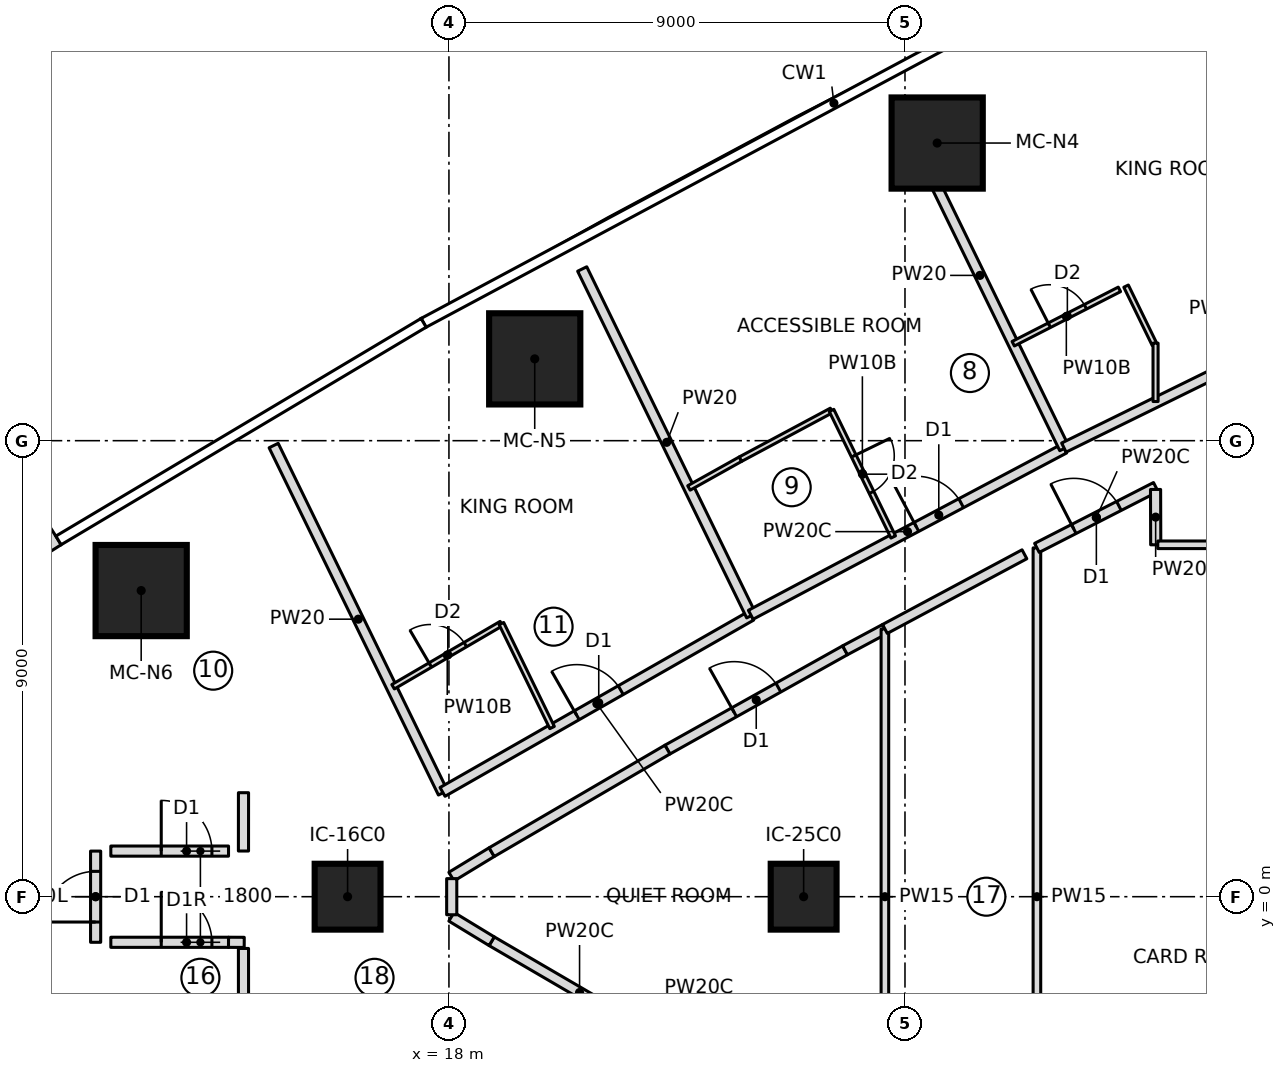
"""IFC4 building model, lengths in metres.
Left out: names, types, materials, properties, quantities, classifications, styles, units other than length and angle.
Written with IfcOpenShell. Run it as: python <this file> out.ifc"""

import sys

from ifc_helpers import new_model, si_unit, direction, frame, frame_2d, origin, origin_2d, place, context, subcontext, project, spatial, polyline, rectangle, outline, extrude, element, fill, save


model = new_model("IFC4")
c1 = context("Model", 3, precision=1e-05, world=origin(), true_north=direction((0.0, 1.0)))
c2 = subcontext(c1, "Body", "Model", "MODEL_VIEW")
j1 = project(units=[si_unit("LENGTHUNIT", "METRE"), si_unit("PLANEANGLEUNIT", "RADIAN")], contexts=[c1])
p1 = place(None, origin())
s1 = spatial("IfcSite", under=j1, at=p1, CompositionType="ELEMENT")
p2 = place(p1, origin())
s2 = spatial("IfcBuilding", under=s1, at=p2, CompositionType="ELEMENT")
p3 = place(p2, frame((0.0, 0.0, 71.55)))
s3 = spatial("IfcBuildingStorey", under=s2, at=p3, CompositionType="ELEMENT", Elevation=71.55)
for number, where, z_axis, x_axis in (
    (1, (27.635, 14.874, 0.0), (0.0, 0.0, 1.0), (1.0, 0.0, 0.0)),
    (2, (19.693, 10.615, 0.0), (0.0, 0.0, 1.0), (1.0, 0.0, 0.0)),
    (3, (11.927, 6.042, 0.0), (0.0, 0.0, 1.0), (1.0, 0.0, 0.0)),
):
    element("IfcColumn", number, at=place(p3, frame(where, z_axis=z_axis, x_axis=x_axis)), inside=s3, PredefinedType="COLUMN", context=c2, shape_type="SweptSolid", body=[
        extrude(rectangle(XDim=1.8, YDim=1.8, at=origin_2d()), origin(), (0.0, 0.0, 1.0), 3.55),
    ])
for number, where, z_axis, x_axis in (
    (4, (16.0, 0.0, 0.0), (0.0, 0.0, 1.0), (1.0, 0.0, 0.0)),
    (5, (25.0, 0.0, 0.0), (0.0, 0.0, 1.0), (1.0, 0.0, 0.0)),
):
    element("IfcColumn", number, at=place(p3, frame(where, z_axis=z_axis, x_axis=x_axis)), inside=s3, PredefinedType="COLUMN", context=c2, shape_type="SweptSolid", body=[
        extrude(rectangle(XDim=1.3, YDim=1.3, at=origin_2d()), origin(), (0.0, 0.0, 1.0), 3.55),
    ])
p4 = place(p3, frame((10.242, 7.116, 0.0), z_axis=(0.0, 0.0, 1.0), x_axis=(-0.844551578623, -0.535474211372, 0.0)))
e6 = element("IfcWall", 6, at=p4, inside=s3, PredefinedType="NOTDEFINED", context=c2, shape_type="SweptSolid", body=[
    extrude(outline(polyline([(0.0, -0.2), (4.23, -0.2), (4.162, 0.2), (0.0, 0.2), (0.0, -0.2)])), origin(), (0.0, 0.0, 1.0), 3.25),
])
p5 = place(p4, frame((0.998, 0.0, 0.6)))
e7 = element("IfcOpeningElement", 7, at=p5, cuts=e6, PredefinedType="OPENING", context=c2, shape_type="SweptSolid", body=[
    extrude(outline(polyline([(0.0, 1.35), (0.084, 1.771), (0.322, 2.128), (0.679, 2.366), (1.1, 2.45), (1.521, 2.366), (1.878, 2.128), (2.116, 1.771), (2.2, 1.35), (2.2, 1.1), (2.116, 0.679), (1.878, 0.322), (1.521, 0.084), (1.1, 0.0), (0.679, 0.084), (0.322, 0.322), (0.084, 0.679), (0.0, 1.1), (0.0, 1.35)])), frame((0.0, 0.21, 0.0), z_axis=(0.0, -1.0, 0.0), x_axis=(1.0, 0.0, 0.0)), (0.0, 0.0, 1.0), 0.42),
])
p6 = place(p3, frame((11.027, -0.9, 0.0), z_axis=(0.0, 0.0, 1.0), x_axis=(0.0, 1.0, 0.0)))
e8 = element("IfcWall", 8, at=p6, inside=s3, PredefinedType="PARTITIONING", context=c2, shape_type="SweptSolid", body=[
    extrude(rectangle(XDim=1.8, YDim=0.2, at=frame_2d((0.9, 0.0))), origin(), (0.0, 0.0, 1.0), 3.15),
])
p7 = place(p6, frame((0.4, 0.0, 0.0)))
e9 = element("IfcOpeningElement", 9, at=p7, cuts=e8, PredefinedType="OPENING", context=c2, shape_type="SweptSolid", body=[
    extrude(rectangle(XDim=1.0, YDim=2.1, at=frame_2d((0.5, 1.05))), frame((0.0, 0.11, 0.0), z_axis=(0.0, -1.0, 0.0), x_axis=(1.0, 0.0, 0.0)), (0.0, 0.0, 1.0), 0.22),
])
p8 = place(p3, frame((17.882, 2.05, 0.0), z_axis=(0.0, 0.0, 1.0), x_axis=(-0.438213564788, 0.898870887078, 0.0)))
e10 = element("IfcWall", 10, at=p8, inside=s3, PredefinedType="PARTITIONING", context=c2, shape_type="SweptSolid", body=[
    extrude(rectangle(XDim=7.625, YDim=0.2, at=frame_2d((3.813, 0.0))), origin(), (0.0, 0.0, 1.0), 3.15),
])
p9 = place(p3, frame((17.874, 2.068, 0.0), z_axis=(0.0, 0.0, 1.0), x_axis=(0.868427275315, 0.495816566373, 0.0)))
e11 = element("IfcWall", 11, at=p9, inside=s3, PredefinedType="PARTITIONING", context=c2, shape_type="SweptSolid", body=[
    extrude(rectangle(XDim=7.015, YDim=0.2, at=frame_2d((3.507, 0.0))), origin(), (0.0, 0.0, 1.0), 3.15),
])
p10 = place(p9, frame((3.05, 0.0, 0.0)))
e12 = element("IfcOpeningElement", 12, at=p10, cuts=e11, PredefinedType="OPENING", context=c2, shape_type="SweptSolid", body=[
    extrude(rectangle(XDim=1.0, YDim=2.1, at=frame_2d((0.5, 1.05))), frame((0.0, 0.11, 0.0), z_axis=(0.0, -1.0, 0.0), x_axis=(1.0, 0.0, 0.0)), (0.0, 0.0, 1.0), 0.22),
])
p11 = place(p3, frame((16.898, 4.144, 0.0), z_axis=(0.0, 0.0, 1.0), x_axis=(0.863707305865, 0.503993739837, 0.0)))
e13 = element("IfcWall", 13, at=p11, inside=s3, PredefinedType="PARTITIONING", context=c2, shape_type="SweptSolid", body=[
    extrude(rectangle(XDim=2.474, YDim=0.1, at=frame_2d((1.237, 0.0))), origin(), (0.0, 0.0, 1.0), 3.15),
])
p12 = place(p11, frame((0.85, 0.0, 0.0)))
e14 = element("IfcOpeningElement", 14, at=p12, cuts=e13, PredefinedType="OPENING", context=c2, shape_type="SweptSolid", body=[
    extrude(rectangle(XDim=0.8, YDim=2.1, at=frame_2d((0.4, 1.05))), frame((0.0, 0.06, 0.0), z_axis=(0.0, -1.0, 0.0), x_axis=(1.0, 0.0, 0.0)), (0.0, 0.0, 1.0), 0.12),
])
p13 = place(p3, frame((19.035, 5.39, 0.0), z_axis=(0.0, 0.0, 1.0), x_axis=(0.438122322582, -0.898915363344, 0.0)))
e15 = element("IfcWall", 15, at=p13, inside=s3, PredefinedType="PARTITIONING", context=c2, shape_type="SweptSolid", body=[
    extrude(rectangle(XDim=2.283, YDim=0.1, at=frame_2d((1.142, 0.0))), origin(), (0.0, 0.0, 1.0), 3.15),
])
p14 = place(p3, frame((23.965, 5.546, 0.0), z_axis=(0.0, 0.0, 1.0), x_axis=(-0.438184754816, 0.898884931816, 0.0)))
e16 = element("IfcWall", 16, at=p14, inside=s3, PredefinedType="PARTITIONING", context=c2, shape_type="SweptSolid", body=[
    extrude(rectangle(XDim=7.612, YDim=0.2, at=frame_2d((3.806, 0.0))), origin(), (0.0, 0.0, 1.0), 3.15),
])
p15 = place(p3, frame((23.957, 5.564, 0.0), z_axis=(0.0, 0.0, 1.0), x_axis=(0.883455325405, 0.468515408513, 0.0)))
e17 = element("IfcWall", 17, at=p15, inside=s3, PredefinedType="PARTITIONING", context=c2, shape_type="SweptSolid", body=[
    extrude(rectangle(XDim=7.004, YDim=0.2, at=frame_2d((3.502, 0.0))), origin(), (0.0, 0.0, 1.0), 3.15),
])
p16 = place(p15, frame((3.7, 0.0, 0.0)))
e18 = element("IfcOpeningElement", 18, at=p16, cuts=e17, PredefinedType="OPENING", context=c2, shape_type="SweptSolid", body=[
    extrude(rectangle(XDim=1.0, YDim=2.1, at=frame_2d((0.5, 1.05))), frame((0.0, 0.11, 0.0), z_axis=(0.0, -1.0, 0.0), x_axis=(1.0, 0.0, 0.0)), (0.0, 0.0, 1.0), 0.22),
])
p17 = place(p3, frame((22.737, 8.067, 0.0), z_axis=(0.0, 0.0, 1.0), x_axis=(0.872799020153, 0.488079778745, 0.0)))
e19 = element("IfcWall", 19, at=p17, inside=s3, PredefinedType="PARTITIONING", context=c2, shape_type="SweptSolid", body=[
    extrude(rectangle(XDim=1.165, YDim=0.1, at=frame_2d((0.582, 0.0))), origin(), (0.0, 0.0, 1.0), 3.15),
])
p18 = place(p3, frame((23.753, 8.635, 0.0), z_axis=(0.0, 0.0, 1.0), x_axis=(0.881675736231, 0.471855800156, 0.0)))
e20 = element("IfcWall", 20, at=p18, inside=s3, PredefinedType="PARTITIONING", context=c2, shape_type="SweptSolid", body=[
    extrude(rectangle(XDim=2.039, YDim=0.1, at=frame_2d((1.019, 0.0))), origin(), (0.0, 0.0, 1.0), 3.15),
])
p19 = place(p3, frame((25.55, 9.597, 0.0), z_axis=(0.0, 0.0, 1.0), x_axis=(0.43822975423, -0.898862994292, 0.0)))
e21 = element("IfcWall", 21, at=p19, inside=s3, PredefinedType="PARTITIONING", context=c2, shape_type="SweptSolid", body=[
    extrude(rectangle(XDim=2.779, YDim=0.1, at=frame_2d((1.389, 0.0))), origin(), (0.0, 0.0, 1.0), 3.15),
])
p20 = place(p19, frame((1.0, 0.0, 0.0)))
e22 = element("IfcOpeningElement", 22, at=p20, cuts=e21, PredefinedType="OPENING", context=c2, shape_type="SweptSolid", body=[
    extrude(rectangle(XDim=0.8, YDim=2.1, at=frame_2d((0.4, 1.05))), frame((0.0, 0.06, 0.0), z_axis=(0.0, -1.0, 0.0), x_axis=(1.0, 0.0, 0.0)), (0.0, 0.0, 1.0), 0.12),
])
p21 = place(p3, frame((30.144, 8.846, 0.0), z_axis=(0.0, 0.0, 1.0), x_axis=(-0.438185054829, 0.898884785567, 0.0)))
e23 = element("IfcWall", 23, at=p21, inside=s3, PredefinedType="PARTITIONING", context=c2, shape_type="SweptSolid", body=[
    extrude(rectangle(XDim=7.601, YDim=0.2, at=frame_2d((3.801, 0.0))), origin(), (0.0, 0.0, 1.0), 3.15),
])
p22 = place(p3, frame((30.135, 8.864, 0.0), z_axis=(0.0, 0.0, 1.0), x_axis=(0.897599118183, 0.44081268475, 0.0)))
e24 = element("IfcWall", 24, at=p22, inside=s3, PredefinedType="PARTITIONING", context=c2, shape_type="SweptSolid", body=[
    extrude(rectangle(XDim=7.0, YDim=0.2, at=frame_2d((3.5, 0.0))), origin(), (0.0, 0.0, 1.0), 3.15),
])
p23 = place(p22, frame((4.25, 0.0, 0.0)))
e25 = element("IfcOpeningElement", 25, at=p23, cuts=e24, PredefinedType="OPENING", context=c2, shape_type="SweptSolid", body=[
    extrude(rectangle(XDim=1.0, YDim=2.1, at=frame_2d((0.5, 1.05))), frame((0.0, 0.11, 0.0), z_axis=(0.0, -1.0, 0.0), x_axis=(1.0, 0.0, 0.0)), (0.0, 0.0, 1.0), 0.22),
])
p24 = place(p3, frame((29.136, 10.914, 0.0), z_axis=(0.0, 0.0, 1.0), x_axis=(0.890219804082, 0.45553122881, 0.0)))
e26 = element("IfcWall", 26, at=p24, inside=s3, PredefinedType="PARTITIONING", context=c2, shape_type="SweptSolid", body=[
    extrude(rectangle(XDim=2.354, YDim=0.1, at=frame_2d((1.177, 0.0))), origin(), (0.0, 0.0, 1.0), 3.15),
])
p25 = place(p24, frame((0.8, 0.0, 0.0)))
e27 = element("IfcOpeningElement", 27, at=p25, cuts=e26, PredefinedType="OPENING", context=c2, shape_type="SweptSolid", body=[
    extrude(rectangle(XDim=0.8, YDim=2.1, at=frame_2d((0.4, 1.05))), frame((0.0, 0.06, 0.0), z_axis=(0.0, -1.0, 0.0), x_axis=(1.0, 0.0, 0.0)), (0.0, 0.0, 1.0), 0.12),
])
p26 = place(p3, frame((31.363, 12.05, 0.0), z_axis=(0.0, 0.0, 1.0), x_axis=(0.438356099343, -0.898801385273, 0.0)))
e28 = element("IfcWall", 28, at=p26, inside=s3, PredefinedType="PARTITIONING", context=c2, shape_type="SweptSolid", body=[
    extrude(rectangle(XDim=1.282, YDim=0.1, at=frame_2d((0.641, 0.0))), origin(), (0.0, 0.0, 1.0), 3.15),
])
p27 = place(p3, frame((22.312, 2.903, 0.0), z_axis=(0.0, 0.0, 1.0), x_axis=(0.872800289292, 0.488077509225, 0.0)))
e29 = element("IfcWall", 29, at=p27, inside=s3, PredefinedType="PARTITIONING", context=c2, shape_type="SweptSolid", body=[
    extrude(rectangle(XDim=4.016, YDim=0.2, at=frame_2d((2.008, 0.0))), origin(), (0.0, 0.0, 1.0), 3.15),
])
p28 = place(p27, frame((1.508, 0.0, 0.0)))
e30 = element("IfcOpeningElement", 30, at=p28, cuts=e29, PredefinedType="OPENING", context=c2, shape_type="SweptSolid", body=[
    extrude(rectangle(XDim=1.0, YDim=2.1, at=frame_2d((0.5, 1.05))), frame((0.0, 0.11, 0.0), z_axis=(0.0, -1.0, 0.0), x_axis=(1.0, 0.0, 0.0)), (0.0, 0.0, 1.0), 0.22),
])
p29 = place(p3, frame((22.312, -2.903, 0.0), z_axis=(0.0, 0.0, 1.0), x_axis=(-0.863710538269, 0.503988200341, 0.0)))
e31 = element("IfcWall", 31, at=p29, inside=s3, PredefinedType="PARTITIONING", context=c2, shape_type="SweptSolid", body=[
    extrude(rectangle(XDim=4.016, YDim=0.2, at=frame_2d((2.008, 0.0))), origin(), (0.0, 0.0, 1.0), 3.15),
])
for number, where, z_axis, x_axis in (
    (32, (18.844, -0.879, 0.0), (0.0, 0.0, 1.0), (-0.854, 0.52, 0.0)),
    (33, (18.05, 0.396, 0.0), (0.0, 0.0, 1.0), (0.854, 0.52, 0.0)),
):
    element("IfcWall", number, at=place(p3, frame(where, z_axis=z_axis, x_axis=x_axis)), inside=s3, PredefinedType="PARTITIONING", context=c2, shape_type="SweptSolid", body=[
        extrude(rectangle(XDim=0.929, YDim=0.2, at=frame_2d((0.464, 0.0))), origin(), (0.0, 0.0, 1.0), 3.15),
    ])
p30 = place(p3, frame((18.844, 0.879, 0.0), z_axis=(0.0, 0.0, 1.0), x_axis=(0.863710538269, 0.503988200341, 0.0)))
e34 = element("IfcWall", 34, at=p30, inside=s3, PredefinedType="PARTITIONING", context=c2, shape_type="SweptSolid", body=[
    extrude(rectangle(XDim=4.016, YDim=0.2, at=frame_2d((2.008, 0.0))), origin(), (0.0, 0.0, 1.0), 3.15),
])
p31 = place(p3, frame((25.817, 4.863, 0.0), z_axis=(0.0, 0.0, 1.0), x_axis=(0.881715816073, 0.471780902207, 0.0)))
e35 = element("IfcWall", 35, at=p31, inside=s3, PredefinedType="PARTITIONING", context=c2, shape_type="SweptSolid", body=[
    extrude(rectangle(XDim=0.892, YDim=0.2, at=frame_2d((0.446, 0.0))), origin(), (0.0, 0.0, 1.0), 3.15),
])
p32 = place(p3, frame((26.604, -5.284, 0.0), z_axis=(0.0, 0.0, 1.0), x_axis=(0.0, 1.0, 0.0)))
e36 = element("IfcWall", 36, at=p32, inside=s3, PredefinedType="PARTITIONING", context=c2, shape_type="SweptSolid", body=[
    extrude(rectangle(XDim=10.568, YDim=0.15, at=frame_2d((5.284, 0.0))), origin(), (0.0, 0.0, 1.0), 3.15),
])
p33 = place(p3, frame((26.604, 5.284, 0.0), z_axis=(0.0, 0.0, 1.0), x_axis=(0.881637943627, 0.471926409895, 0.0)))
e37 = element("IfcWall", 37, at=p33, inside=s3, PredefinedType="PARTITIONING", context=c2, shape_type="SweptSolid", body=[
    extrude(rectangle(XDim=3.124, YDim=0.2, at=frame_2d((1.562, 0.0))), origin(), (0.0, 0.0, 1.0), 3.15),
])
p34 = place(p3, frame((29.604, -6.884, 0.0), z_axis=(0.0, 0.0, 1.0), x_axis=(0.0, 1.0, 0.0)))
e38 = element("IfcWall", 38, at=p34, inside=s3, PredefinedType="PARTITIONING", context=c2, shape_type="SweptSolid", body=[
    extrude(rectangle(XDim=13.768, YDim=0.15, at=frame_2d((6.884, 0.0))), origin(), (0.0, 0.0, 1.0), 3.15),
])
p35 = place(p3, frame((29.604, 6.884, 0.0), z_axis=(0.0, 0.0, 1.0), x_axis=(0.890220210981, 0.455530433628, 0.0)))
e39 = element("IfcWall", 39, at=p35, inside=s3, PredefinedType="PARTITIONING", context=c2, shape_type="SweptSolid", body=[
    extrude(rectangle(XDim=2.636, YDim=0.2, at=frame_2d((1.318, 0.0))), origin(), (0.0, 0.0, 1.0), 3.15),
])
p36 = place(p35, frame((0.818, 0.0, 0.0)))
e40 = element("IfcOpeningElement", 40, at=p36, cuts=e39, PredefinedType="OPENING", context=c2, shape_type="SweptSolid", body=[
    extrude(rectangle(XDim=1.0, YDim=2.1, at=frame_2d((0.5, 1.05))), frame((0.0, 0.11, 0.0), z_axis=(0.0, -1.0, 0.0), x_axis=(1.0, 0.0, 0.0)), (0.0, 0.0, 1.0), 0.22),
])
p37 = place(p3, frame((31.945, 10.926, 0.0), z_axis=(0.0, 0.0, 1.0), x_axis=(0.0, -1.0, 0.0)))
e41 = element("IfcWall", 41, at=p37, inside=s3, PredefinedType="PARTITIONING", context=c2, shape_type="SweptSolid", body=[
    extrude(rectangle(XDim=1.153, YDim=0.1, at=frame_2d((0.576, 0.0))), origin(), (0.0, 0.0, 1.0), 3.15),
])
p38 = place(p3, frame((11.327, 0.9, 0.0), z_axis=(0.0, 0.0, 1.0), x_axis=(1.0, 0.0, 0.0)))
e42 = element("IfcWall", 42, at=p38, inside=s3, PredefinedType="PARTITIONING", context=c2, shape_type="SweptSolid", body=[
    extrude(rectangle(XDim=2.323, YDim=0.2, at=frame_2d((1.161, 0.0))), origin(), (0.0, 0.0, 1.0), 3.15),
])
p39 = place(p38, frame((0.995, 0.0, 0.0)))
e43 = element("IfcOpeningElement", 43, at=p39, cuts=e42, PredefinedType="OPENING", context=c2, shape_type="SweptSolid", body=[
    extrude(rectangle(XDim=1.0, YDim=2.1, at=frame_2d((0.5, 1.05))), frame((0.0, 0.11, 0.0), z_axis=(0.0, -1.0, 0.0), x_axis=(1.0, 0.0, 0.0)), (0.0, 0.0, 1.0), 0.22),
])
p40 = place(p3, frame((11.327, -0.9, 0.0), z_axis=(0.0, 0.0, 1.0), x_axis=(1.0, 0.0, 0.0)))
e44 = element("IfcWall", 44, at=p40, inside=s3, PredefinedType="PARTITIONING", context=c2, shape_type="SweptSolid", body=[
    extrude(rectangle(XDim=2.323, YDim=0.2, at=frame_2d((1.161, 0.0))), origin(), (0.0, 0.0, 1.0), 3.15),
])
p41 = place(p40, frame((0.995, 0.0, 0.0)))
e45 = element("IfcOpeningElement", 45, at=p41, cuts=e44, PredefinedType="OPENING", context=c2, shape_type="SweptSolid", body=[
    extrude(rectangle(XDim=1.0, YDim=2.1, at=frame_2d((0.5, 1.05))), frame((0.0, 0.11, 0.0), z_axis=(0.0, -1.0, 0.0), x_axis=(1.0, 0.0, 0.0)), (0.0, 0.0, 1.0), 0.22),
])
p42 = place(p3, frame((18.055, -0.357, 0.0), z_axis=(0.0, 0.0, 1.0), x_axis=(0.0, 1.0, 0.0)))
e46 = element("IfcWall", 46, at=p42, inside=s3, PredefinedType="PARTITIONING", context=c2, shape_type="SweptSolid", body=[
    extrude(rectangle(XDim=0.713, YDim=0.2, at=frame_2d((0.357, 0.0))), origin(), (0.0, 0.0, 1.0), 3.15),
])
p43 = place(p3, frame((31.945, 8.037, 0.0), z_axis=(0.0, 0.0, 1.0), x_axis=(0.003129875123, -0.999995101929, 0.0)))
e47 = element("IfcWall", 47, at=p43, inside=s3, PredefinedType="PARTITIONING", context=c2, shape_type="SweptSolid", body=[
    extrude(rectangle(XDim=1.092, YDim=0.2, at=frame_2d((0.546, 0.0))), origin(), (0.0, 0.0, 1.0), 3.15),
])
p44 = place(p3, frame((31.989, 6.945, 0.0), z_axis=(0.0, 0.0, 1.0), x_axis=(0.999999997987, -6.3451777e-05, 0.0)))
e48 = element("IfcWall", 48, at=p44, inside=s3, PredefinedType="PARTITIONING", context=c2, shape_type="SweptSolid", body=[
    extrude(rectangle(XDim=3.848, YDim=0.15, at=frame_2d((1.924, 0.0))), origin(), (0.0, 0.0, 1.0), 3.15),
])
p45 = place(p3, frame((13.946, 2.052, 0.0), z_axis=(0.0, 0.0, 1.0), x_axis=(-0.000424178117, -0.999999910036, 0.0)))
e49 = element("IfcWall", 49, at=p45, inside=s3, PredefinedType="PARTITIONING", context=c2, shape_type="SweptSolid", body=[
    extrude(rectangle(XDim=1.151, YDim=0.2, at=frame_2d((0.576, 0.0))), origin(), (0.0, 0.0, 1.0), 3.15),
])
p46 = place(p3, frame((13.65, -0.9, 0.0), z_axis=(0.0, 0.0, 1.0), x_axis=(0.999984810316, -0.005511727301, 0.0)))
e50 = element("IfcWall", 50, at=p46, inside=s3, PredefinedType="PARTITIONING", context=c2, shape_type="SweptSolid", body=[
    extrude(rectangle(XDim=0.31, YDim=0.2, at=frame_2d((0.155, 0.0))), origin(), (0.0, 0.0, 1.0), 3.15),
])
p47 = place(p3, frame((13.945, -1.021, 0.0), z_axis=(0.0, 0.0, 1.0), x_axis=(0.000473596916, -0.999999887853, 0.0)))
e51 = element("IfcWall", 51, at=p47, inside=s3, PredefinedType="PARTITIONING", context=c2, shape_type="SweptSolid", body=[
    extrude(rectangle(XDim=1.031, YDim=0.2, at=frame_2d((0.516, 0.0))), origin(), (0.0, 0.0, 1.0), 3.15),
])
p48 = place(p39, origin())
e52 = element("IfcDoor", 52, at=p48, inside=s3, OperationType="SINGLE_SWING_LEFT", PredefinedType="DOOR", context=c2, shape_type="SweptSolid", body=[
    extrude(rectangle(XDim=1.0, YDim=2.1, at=frame_2d((0.5, 1.05))), frame((0.0, 0.025, 0.0), z_axis=(0.0, -1.0, 0.0), x_axis=(1.0, 0.0, 0.0)), (0.0, 0.0, 1.0), 0.05),
])
fill(e43, e52)
p49 = place(p41, origin())
e53 = element("IfcDoor", 53, at=p49, inside=s3, OperationType="SINGLE_SWING_RIGHT", PredefinedType="DOOR", context=c2, shape_type="SweptSolid", body=[
    extrude(rectangle(XDim=1.0, YDim=2.1, at=frame_2d((0.5, 1.05))), frame((0.0, 0.025, 0.0), z_axis=(0.0, -1.0, 0.0), x_axis=(1.0, 0.0, 0.0)), (0.0, 0.0, 1.0), 0.05),
])
fill(e45, e53)
p50 = place(p7, origin())
e54 = element("IfcDoor", 54, at=p50, inside=s3, OperationType="SINGLE_SWING_LEFT", PredefinedType="DOOR", context=c2, shape_type="SweptSolid", body=[
    extrude(rectangle(XDim=1.0, YDim=2.1, at=frame_2d((0.5, 1.05))), frame((0.0, 0.025, 0.0), z_axis=(0.0, -1.0, 0.0), x_axis=(1.0, 0.0, 0.0)), (0.0, 0.0, 1.0), 0.05),
])
fill(e9, e54)
p51 = place(p12, origin())
e55 = element("IfcDoor", 55, at=p51, inside=s3, OperationType="SINGLE_SWING_LEFT", PredefinedType="DOOR", context=c2, shape_type="SweptSolid", body=[
    extrude(rectangle(XDim=0.8, YDim=2.1, at=frame_2d((0.4, 1.05))), frame((0.0, 0.025, 0.0), z_axis=(0.0, -1.0, 0.0), x_axis=(1.0, 0.0, 0.0)), (0.0, 0.0, 1.0), 0.05),
])
fill(e14, e55)
p52 = place(p10, origin())
e56 = element("IfcDoor", 56, at=p52, inside=s3, OperationType="SINGLE_SWING_LEFT", PredefinedType="DOOR", context=c2, shape_type="SweptSolid", body=[
    extrude(rectangle(XDim=1.0, YDim=2.1, at=frame_2d((0.5, 1.05))), frame((0.0, 0.025, 0.0), z_axis=(0.0, -1.0, 0.0), x_axis=(1.0, 0.0, 0.0)), (0.0, 0.0, 1.0), 0.05),
])
fill(e12, e56)
p53 = place(p20, origin())
e57 = element("IfcDoor", 57, at=p53, inside=s3, OperationType="SINGLE_SWING_LEFT", PredefinedType="DOOR", context=c2, shape_type="SweptSolid", body=[
    extrude(rectangle(XDim=0.8, YDim=2.1, at=frame_2d((0.4, 1.05))), frame((0.0, 0.025, 0.0), z_axis=(0.0, -1.0, 0.0), x_axis=(1.0, 0.0, 0.0)), (0.0, 0.0, 1.0), 0.05),
])
fill(e22, e57)
p54 = place(p16, origin())
e58 = element("IfcDoor", 58, at=p54, inside=s3, OperationType="SINGLE_SWING_LEFT", PredefinedType="DOOR", context=c2, shape_type="SweptSolid", body=[
    extrude(rectangle(XDim=1.0, YDim=2.1, at=frame_2d((0.5, 1.05))), frame((0.0, 0.025, 0.0), z_axis=(0.0, -1.0, 0.0), x_axis=(1.0, 0.0, 0.0)), (0.0, 0.0, 1.0), 0.05),
])
fill(e18, e58)
p55 = place(p25, origin())
e59 = element("IfcDoor", 59, at=p55, inside=s3, OperationType="SINGLE_SWING_LEFT", PredefinedType="DOOR", context=c2, shape_type="SweptSolid", body=[
    extrude(rectangle(XDim=0.8, YDim=2.1, at=frame_2d((0.4, 1.05))), frame((0.0, 0.025, 0.0), z_axis=(0.0, -1.0, 0.0), x_axis=(1.0, 0.0, 0.0)), (0.0, 0.0, 1.0), 0.05),
])
fill(e27, e59)
p56 = place(p28, origin())
e60 = element("IfcDoor", 60, at=p56, inside=s3, OperationType="SINGLE_SWING_LEFT", PredefinedType="DOOR", context=c2, shape_type="SweptSolid", body=[
    extrude(rectangle(XDim=1.0, YDim=2.1, at=frame_2d((0.5, 1.05))), frame((0.0, 0.025, 0.0), z_axis=(0.0, -1.0, 0.0), x_axis=(1.0, 0.0, 0.0)), (0.0, 0.0, 1.0), 0.05),
])
fill(e30, e60)
p57 = place(p36, origin())
e61 = element("IfcDoor", 61, at=p57, inside=s3, OperationType="SINGLE_SWING_LEFT", PredefinedType="DOOR", context=c2, shape_type="SweptSolid", body=[
    extrude(rectangle(XDim=1.0, YDim=2.1, at=frame_2d((0.5, 1.05))), frame((0.0, 0.025, 0.0), z_axis=(0.0, -1.0, 0.0), x_axis=(1.0, 0.0, 0.0)), (0.0, 0.0, 1.0), 0.05),
])
fill(e40, e61)
save(model, sys.argv[1])
